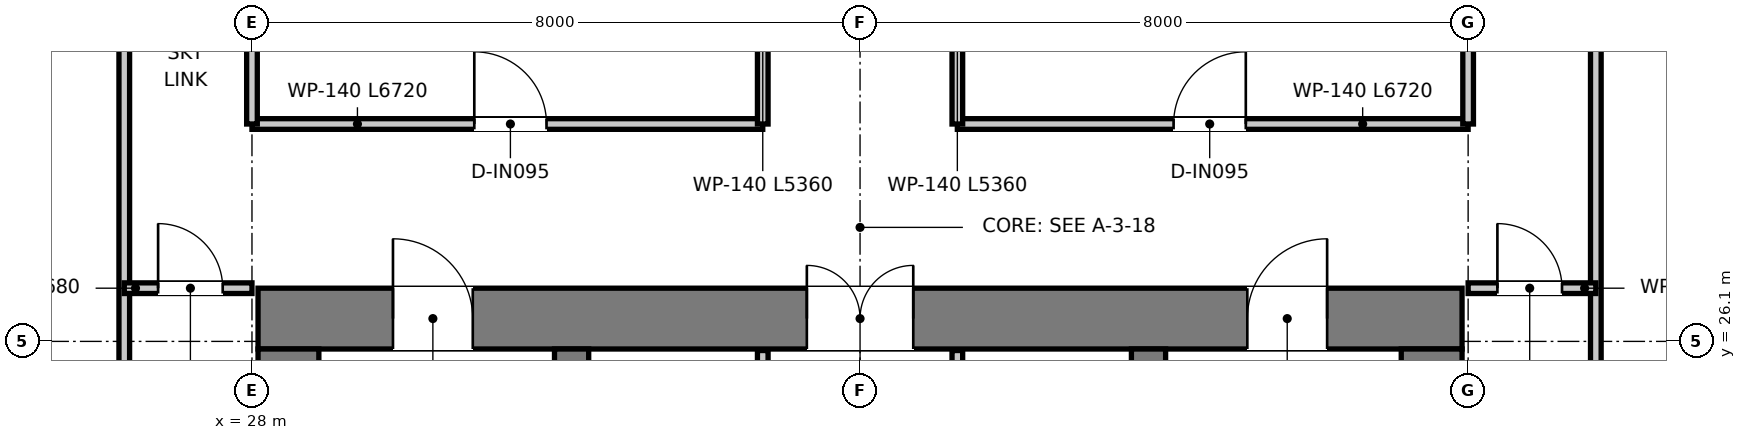
"""IFC4 building model, lengths in metres.
Left out: names, types, materials, properties, quantities, classifications, styles, units other than length and angle.
Written with IfcOpenShell. Run it as: python <this file> out.ifc"""

import sys

from ifc_helpers import new_model, si_unit, direction, frame, frame_2d, origin, place, context, subcontext, project, spatial, rectangle, extrude, element, fill, save


model = new_model("IFC4")
c1 = context("Model", 3, precision=1e-05, world=origin(), true_north=direction((0.0, 1.0)))
c2 = subcontext(c1, "Body", "Model", "MODEL_VIEW")
j1 = project(units=[si_unit("LENGTHUNIT", "METRE"), si_unit("PLANEANGLEUNIT", "RADIAN")], contexts=[c1])
p1 = place(None, origin())
s1 = spatial("IfcSite", under=j1, at=p1, CompositionType="ELEMENT")
p2 = place(p1, origin())
s2 = spatial("IfcBuilding", under=s1, at=p2, CompositionType="ELEMENT")
p3 = place(p2, frame((0.0, 0.0, 262.6)))
s3 = spatial("IfcBuildingStorey", under=s2, at=p3, CompositionType="ELEMENT", Elevation=262.6)
p4 = place(p3, frame((28.08, 26.4, 0.0), z_axis=(0.0, 0.0, 1.0), x_axis=(1.0, 0.0, 0.0)))
e1 = element("IfcWall", 1, at=p4, inside=s3, PredefinedType="SHEAR", context=c2, shape_type="SweptSolid", body=[
    extrude(rectangle(XDim=15.84, YDim=0.8, at=frame_2d((7.92, 0.0))), origin(), (0.0, 0.0, 1.0), 4.8),
])
p5 = place(p4, frame((7.22, 0.0, 0.0)))
e2 = element("IfcOpeningElement", 2, at=p5, cuts=e1, PredefinedType="OPENING", context=c2, shape_type="SweptSolid", body=[
    extrude(rectangle(XDim=1.4, YDim=2.2, at=frame_2d((0.7, 1.1))), frame((0.0, 0.41, 0.0), z_axis=(0.0, -1.0, 0.0), x_axis=(1.0, 0.0, 0.0)), (0.0, 0.0, 1.0), 0.82),
])
p6 = place(p4, frame((1.775, 0.0, 0.0)))
e3 = element("IfcOpeningElement", 3, at=p6, cuts=e1, PredefinedType="OPENING", context=c2, shape_type="SweptSolid", body=[
    extrude(rectangle(XDim=1.05, YDim=2.1, at=frame_2d((0.525, 1.05))), frame((0.0, 0.41, 0.0), z_axis=(0.0, -1.0, 0.0), x_axis=(1.0, 0.0, 0.0)), (0.0, 0.0, 1.0), 0.82),
])
p7 = place(p4, frame((13.015, 0.0, 0.0)))
e4 = element("IfcOpeningElement", 4, at=p7, cuts=e1, PredefinedType="OPENING", context=c2, shape_type="SweptSolid", body=[
    extrude(rectangle(XDim=1.05, YDim=2.1, at=frame_2d((0.525, 1.05))), frame((0.0, 0.41, 0.0), z_axis=(0.0, -1.0, 0.0), x_axis=(1.0, 0.0, 0.0)), (0.0, 0.0, 1.0), 0.82),
])
for number, where, z_axis, x_axis in (
    (5, (28.48, 11.3, 0.0), (0.0, 0.0, 1.0), (0.0, 1.0, 0.0)),
    (6, (43.52, 11.3, 0.0), (0.0, 0.0, 1.0), (0.0, 1.0, 0.0)),
):
    element("IfcWall", number, at=place(p3, frame(where, z_axis=z_axis, x_axis=x_axis)), inside=s3, PredefinedType="SHEAR", context=c2, shape_type="SweptSolid", body=[
        extrude(rectangle(XDim=14.7, YDim=0.8, at=frame_2d((7.35, 0.0))), origin(), (0.0, 0.0, 1.0), 4.8),
    ])
p8 = place(p3, frame((32.205, 13.22, 0.0), z_axis=(0.0, 0.0, 1.0), x_axis=(0.0, 1.0, 0.0)))
e7 = element("IfcWall", 7, at=p8, inside=s3, PredefinedType="SHEAR", context=c2, shape_type="SweptSolid", body=[
    extrude(rectangle(XDim=12.78, YDim=0.45, at=frame_2d((6.39, 0.0))), origin(), (0.0, 0.0, 1.0), 4.8),
])
p9 = place(p8, frame((10.58, 0.0, 0.0)))
e8 = element("IfcOpeningElement", 8, at=p9, cuts=e7, PredefinedType="OPENING", context=c2, shape_type="SweptSolid", body=[
    extrude(rectangle(XDim=1.1, YDim=2.15, at=frame_2d((0.55, 1.075))), frame((0.0, 0.235, 0.0), z_axis=(0.0, -1.0, 0.0), x_axis=(1.0, 0.0, 0.0)), (0.0, 0.0, 1.0), 0.47),
])
p10 = place(p3, frame((39.795, 13.22, 0.0), z_axis=(0.0, 0.0, 1.0), x_axis=(0.0, 1.0, 0.0)))
e9 = element("IfcWall", 9, at=p10, inside=s3, PredefinedType="SHEAR", context=c2, shape_type="SweptSolid", body=[
    extrude(rectangle(XDim=12.78, YDim=0.45, at=frame_2d((6.39, 0.0))), origin(), (0.0, 0.0, 1.0), 4.8),
])
p11 = place(p10, frame((10.58, 0.0, 0.0)))
e10 = element("IfcOpeningElement", 10, at=p11, cuts=e9, PredefinedType="OPENING", context=c2, shape_type="SweptSolid", body=[
    extrude(rectangle(XDim=1.1, YDim=2.15, at=frame_2d((0.55, 1.075))), frame((0.0, 0.235, 0.0), z_axis=(0.0, -1.0, 0.0), x_axis=(1.0, 0.0, 0.0)), (0.0, 0.0, 1.0), 0.47),
])
p12 = place(p3, frame((34.72, 20.2, 0.0), z_axis=(0.0, 0.0, 1.0), x_axis=(0.0, 1.0, 0.0)))
e11 = element("IfcWall", 11, at=p12, inside=s3, PredefinedType="PARTITIONING", context=c2, shape_type="SweptSolid", body=[
    extrude(rectangle(XDim=5.78, YDim=0.14, at=frame_2d((2.89, 0.0))), origin(), (0.0, 0.0, 1.0), 3.67),
])
p13 = place(p12, frame((1.05, 0.0, 0.0)))
e12 = element("IfcOpeningElement", 12, at=p13, cuts=e11, PredefinedType="OPENING", context=c2, shape_type="SweptSolid", body=[
    extrude(rectangle(XDim=0.9, YDim=2.1, at=frame_2d((0.45, 1.05))), frame((0.0, 0.08, 0.0), z_axis=(0.0, -1.0, 0.0), x_axis=(1.0, 0.0, 0.0)), (0.0, 0.0, 1.0), 0.16),
])
p14 = place(p3, frame((37.28, 20.2, 0.0), z_axis=(0.0, 0.0, 1.0), x_axis=(0.0, 1.0, 0.0)))
e13 = element("IfcWall", 13, at=p14, inside=s3, PredefinedType="PARTITIONING", context=c2, shape_type="SweptSolid", body=[
    extrude(rectangle(XDim=5.78, YDim=0.14, at=frame_2d((2.89, 0.0))), origin(), (0.0, 0.0, 1.0), 3.67),
])
p15 = place(p14, frame((0.95, 0.0, 0.0)))
e14 = element("IfcOpeningElement", 14, at=p15, cuts=e13, PredefinedType="OPENING", context=c2, shape_type="SweptSolid", body=[
    extrude(rectangle(XDim=1.1, YDim=2.15, at=frame_2d((0.55, 1.075))), frame((0.0, 0.08, 0.0), z_axis=(0.0, -1.0, 0.0), x_axis=(1.0, 0.0, 0.0)), (0.0, 0.0, 1.0), 0.16),
])
p16 = place(p3, frame((28.0, 28.96, 0.0), z_axis=(0.0, 0.0, 1.0), x_axis=(1.0, 0.0, 0.0)))
e15 = element("IfcWall", 15, at=p16, inside=s3, PredefinedType="PARTITIONING", context=c2, shape_type="SweptSolid", body=[
    extrude(rectangle(XDim=6.72, YDim=0.14, at=frame_2d((3.36, 0.0))), origin(), (0.0, 0.0, 1.0), 4.03),
])
p17 = place(p16, frame((2.925, 0.0, 0.0)))
e16 = element("IfcOpeningElement", 16, at=p17, cuts=e15, PredefinedType="OPENING", context=c2, shape_type="SweptSolid", body=[
    extrude(rectangle(XDim=0.95, YDim=2.1, at=frame_2d((0.475, 1.05))), frame((0.0, 0.08, 0.0), z_axis=(0.0, -1.0, 0.0), x_axis=(1.0, 0.0, 0.0)), (0.0, 0.0, 1.0), 0.16),
])
p18 = place(p3, frame((37.28, 28.96, 0.0), z_axis=(0.0, 0.0, 1.0), x_axis=(1.0, 0.0, 0.0)))
e17 = element("IfcWall", 17, at=p18, inside=s3, PredefinedType="PARTITIONING", context=c2, shape_type="SweptSolid", body=[
    extrude(rectangle(XDim=6.72, YDim=0.14, at=frame_2d((3.36, 0.0))), origin(), (0.0, 0.0, 1.0), 4.03),
])
p19 = place(p18, frame((2.845, 0.0, 0.0)))
e18 = element("IfcOpeningElement", 18, at=p19, cuts=e17, PredefinedType="OPENING", context=c2, shape_type="SweptSolid", body=[
    extrude(rectangle(XDim=0.95, YDim=2.1, at=frame_2d((0.475, 1.05))), frame((0.0, 0.08, 0.0), z_axis=(0.0, -1.0, 0.0), x_axis=(1.0, 0.0, 0.0)), (0.0, 0.0, 1.0), 0.16),
])
for number, where, z_axis, x_axis in (
    (19, (34.72, 28.96, 0.0), (0.0, 0.0, 1.0), (0.0, 1.0, 0.0)),
    (20, (37.28, 28.96, 0.0), (0.0, 0.0, 1.0), (0.0, 1.0, 0.0)),
):
    element("IfcWall", number, at=place(p3, frame(where, z_axis=z_axis, x_axis=x_axis)), inside=s3, PredefinedType="PARTITIONING", context=c2, shape_type="SweptSolid", body=[
        extrude(rectangle(XDim=5.36, YDim=0.14, at=frame_2d((2.68, 0.0))), origin(), (0.0, 0.0, 1.0), 4.12),
    ])
for number, where, z_axis, x_axis in (
    (21, (28.0, 28.96, 0.0), (0.0, 0.0, 1.0), (0.0, 1.0, 0.0)),
    (22, (44.0, 28.96, 0.0), (0.0, 0.0, 1.0), (0.0, 1.0, 0.0)),
):
    element("IfcWall", number, at=place(p3, frame(where, z_axis=z_axis, x_axis=x_axis)), inside=s3, PredefinedType="PARTITIONING", context=c2, shape_type="SweptSolid", body=[
        extrude(rectangle(XDim=5.36, YDim=0.14, at=frame_2d((2.68, 0.0))), origin(), (0.0, 0.0, 1.0), 4.22),
    ])
p20 = place(p3, frame((26.32, 10.5, 0.0), z_axis=(0.0, 0.0, 1.0), x_axis=(0.0, 1.0, 0.0)))
e23 = element("IfcWall", 23, at=p20, inside=s3, PredefinedType="PARTITIONING", context=c2, shape_type="SweptSolid", body=[
    extrude(rectangle(XDim=34.624, YDim=0.14, at=frame_2d((17.312, 0.0))), origin(), (0.0, 0.0, 1.0), 3.88),
])
p21 = place(p20, frame((20.45, 0.0, 0.0)))
e24 = element("IfcOpeningElement", 24, at=p21, cuts=e23, PredefinedType="OPENING", context=c2, shape_type="SweptSolid", body=[
    extrude(rectangle(XDim=1.1, YDim=2.15, at=frame_2d((0.55, 1.075))), frame((0.0, 0.08, 0.0), z_axis=(0.0, -1.0, 0.0), x_axis=(1.0, 0.0, 0.0)), (0.0, 0.0, 1.0), 0.16),
])
p22 = place(p3, frame((45.68, 8.276, 0.0), z_axis=(0.0, 0.0, 1.0), x_axis=(0.0, 1.0, 0.0)))
e25 = element("IfcWall", 25, at=p22, inside=s3, PredefinedType="PARTITIONING", context=c2, shape_type="SweptSolid", body=[
    extrude(rectangle(XDim=38.902, YDim=0.14, at=frame_2d((19.451, 0.0))), origin(), (0.0, 0.0, 1.0), 3.88),
])
p23 = place(p22, frame((22.674, 0.0, 0.0)))
e26 = element("IfcOpeningElement", 26, at=p23, cuts=e25, PredefinedType="OPENING", context=c2, shape_type="SweptSolid", body=[
    extrude(rectangle(XDim=1.1, YDim=2.15, at=frame_2d((0.55, 1.075))), frame((0.0, 0.08, 0.0), z_axis=(0.0, -1.0, 0.0), x_axis=(1.0, 0.0, 0.0)), (0.0, 0.0, 1.0), 0.16),
])
p24 = place(p3, frame((26.32, 26.8, 0.0), z_axis=(0.0, 0.0, 1.0), x_axis=(1.0, 0.0, 0.0)))
e27 = element("IfcWall", 27, at=p24, inside=s3, PredefinedType="PARTITIONING", context=c2, shape_type="SweptSolid", body=[
    extrude(rectangle(XDim=1.68, YDim=0.14, at=frame_2d((0.84, 0.0))), origin(), (0.0, 0.0, 1.0), 4.03),
])
p25 = place(p24, frame((0.445, 0.0, 0.0)))
e28 = element("IfcOpeningElement", 28, at=p25, cuts=e27, PredefinedType="OPENING", context=c2, shape_type="SweptSolid", body=[
    extrude(rectangle(XDim=0.85, YDim=2.1, at=frame_2d((0.425, 1.05))), frame((0.0, 0.08, 0.0), z_axis=(0.0, -1.0, 0.0), x_axis=(1.0, 0.0, 0.0)), (0.0, 0.0, 1.0), 0.16),
])
p26 = place(p3, frame((44.0, 26.8, 0.0), z_axis=(0.0, 0.0, 1.0), x_axis=(1.0, 0.0, 0.0)))
e29 = element("IfcWall", 29, at=p26, inside=s3, PredefinedType="PARTITIONING", context=c2, shape_type="SweptSolid", body=[
    extrude(rectangle(XDim=1.68, YDim=0.14, at=frame_2d((0.84, 0.0))), origin(), (0.0, 0.0, 1.0), 4.03),
])
p27 = place(p26, frame((0.385, 0.0, 0.0)))
e30 = element("IfcOpeningElement", 30, at=p27, cuts=e29, PredefinedType="OPENING", context=c2, shape_type="SweptSolid", body=[
    extrude(rectangle(XDim=0.85, YDim=2.1, at=frame_2d((0.425, 1.05))), frame((0.0, 0.08, 0.0), z_axis=(0.0, -1.0, 0.0), x_axis=(1.0, 0.0, 0.0)), (0.0, 0.0, 1.0), 0.16),
])
p28 = place(p5, origin())
e31 = element("IfcDoor", 31, at=p28, inside=s3, OperationType="DOUBLE_DOOR_SINGLE_SWING", PredefinedType="DOOR", context=c2, shape_type="SweptSolid", body=[
    extrude(rectangle(XDim=1.4, YDim=2.2, at=frame_2d((0.7, 1.1))), frame((0.0, 0.025, 0.0), z_axis=(0.0, -1.0, 0.0), x_axis=(1.0, 0.0, 0.0)), (0.0, 0.0, 1.0), 0.05),
])
fill(e2, e31)
p29 = place(p6, origin())
e32 = element("IfcDoor", 32, at=p29, inside=s3, OperationType="SINGLE_SWING_LEFT", PredefinedType="DOOR", context=c2, shape_type="SweptSolid", body=[
    extrude(rectangle(XDim=1.05, YDim=2.1, at=frame_2d((0.525, 1.05))), frame((0.0, 0.025, 0.0), z_axis=(0.0, -1.0, 0.0), x_axis=(1.0, 0.0, 0.0)), (0.0, 0.0, 1.0), 0.05),
])
fill(e3, e32)
p30 = place(p7, origin())
e33 = element("IfcDoor", 33, at=p30, inside=s3, OperationType="SINGLE_SWING_RIGHT", PredefinedType="DOOR", context=c2, shape_type="SweptSolid", body=[
    extrude(rectangle(XDim=1.05, YDim=2.1, at=frame_2d((0.525, 1.05))), frame((0.0, 0.025, 0.0), z_axis=(0.0, -1.0, 0.0), x_axis=(1.0, 0.0, 0.0)), (0.0, 0.0, 1.0), 0.05),
])
fill(e4, e33)
p31 = place(p17, origin())
e34 = element("IfcDoor", 34, at=p31, inside=s3, OperationType="SINGLE_SWING_LEFT", PredefinedType="DOOR", context=c2, shape_type="SweptSolid", body=[
    extrude(rectangle(XDim=0.95, YDim=2.1, at=frame_2d((0.475, 1.05))), frame((0.0, 0.025, 0.0), z_axis=(0.0, -1.0, 0.0), x_axis=(1.0, 0.0, 0.0)), (0.0, 0.0, 1.0), 0.05),
])
fill(e16, e34)
p32 = place(p19, origin())
e35 = element("IfcDoor", 35, at=p32, inside=s3, OperationType="SINGLE_SWING_RIGHT", PredefinedType="DOOR", context=c2, shape_type="SweptSolid", body=[
    extrude(rectangle(XDim=0.95, YDim=2.1, at=frame_2d((0.475, 1.05))), frame((0.0, 0.025, 0.0), z_axis=(0.0, -1.0, 0.0), x_axis=(1.0, 0.0, 0.0)), (0.0, 0.0, 1.0), 0.05),
])
fill(e18, e35)
p33 = place(p25, origin())
e36 = element("IfcDoor", 36, at=p33, inside=s3, OperationType="SINGLE_SWING_LEFT", PredefinedType="DOOR", context=c2, shape_type="SweptSolid", body=[
    extrude(rectangle(XDim=0.85, YDim=2.1, at=frame_2d((0.425, 1.05))), frame((0.0, 0.025, 0.0), z_axis=(0.0, -1.0, 0.0), x_axis=(1.0, 0.0, 0.0)), (0.0, 0.0, 1.0), 0.05),
])
fill(e28, e36)
p34 = place(p27, origin())
e37 = element("IfcDoor", 37, at=p34, inside=s3, OperationType="SINGLE_SWING_LEFT", PredefinedType="DOOR", context=c2, shape_type="SweptSolid", body=[
    extrude(rectangle(XDim=0.85, YDim=2.1, at=frame_2d((0.425, 1.05))), frame((0.0, 0.025, 0.0), z_axis=(0.0, -1.0, 0.0), x_axis=(1.0, 0.0, 0.0)), (0.0, 0.0, 1.0), 0.05),
])
fill(e30, e37)
save(model, sys.argv[1])
